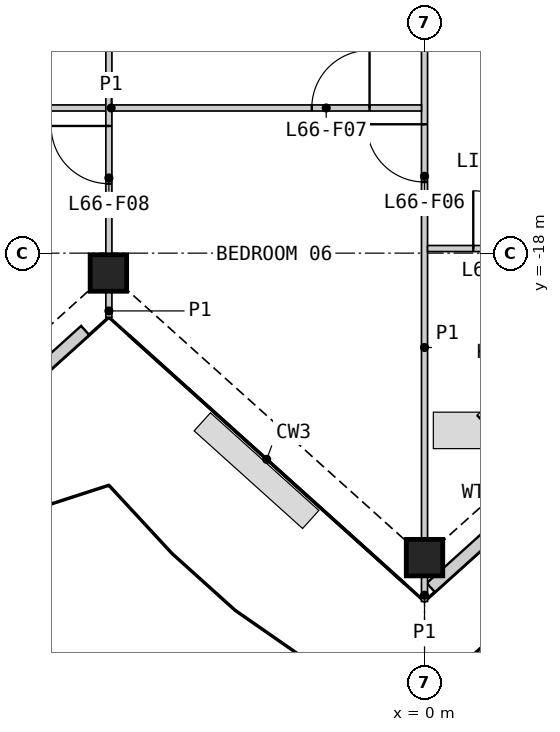
"""IFC4 building model, lengths in metres.
Left out: names, types, materials, properties, quantities, classifications, styles, units other than length and angle.
Written with IfcOpenShell. Run it as: python <this file> out.ifc"""

import sys

from ifc_helpers import new_model, si_unit, direction, frame, frame_2d, origin, origin_2d, place, context, subcontext, project, spatial, rectangle, hollow_rectangle, extrude, element, fill, save


model = new_model("IFC4")
c1 = context("Model", 3, precision=1e-05, world=origin(), true_north=direction((0.0, 1.0)))
c2 = subcontext(c1, "Body", "Model", "MODEL_VIEW")
j1 = project(units=[si_unit("LENGTHUNIT", "METRE"), si_unit("PLANEANGLEUNIT", "RADIAN")], contexts=[c1])
p1 = place(None, origin())
s1 = spatial("IfcSite", under=j1, at=p1, CompositionType="ELEMENT")
p2 = place(p1, origin())
s2 = spatial("IfcBuilding", under=s1, at=p2, CompositionType="ELEMENT")
p3 = place(p2, frame((0.0, 0.0, 305.2)))
s3 = spatial("IfcBuildingStorey", under=s2, at=p3, CompositionType="ELEMENT", Elevation=305.2)
for number, where, z_axis, x_axis in (
    (1, (-5.199, -18.327, 0.0), (0.0, 0.0, 1.0), (1.0, 0.0, 0.0)),
    (2, (0.0, -23.008, 0.0), (0.0, 0.0, 1.0), (1.0, 0.0, 0.0)),
):
    element("IfcColumn", number, at=place(p3, frame(where, z_axis=z_axis, x_axis=x_axis)), inside=s3, PredefinedType="COLUMN", context=c2, shape_type="SweptSolid", body=[
        extrude(hollow_rectangle(XDim=0.6, YDim=0.6, WallThickness=0.04, at=origin_2d()), origin(), (0.0, 0.0, 1.0), 3.4),
    ])
p4 = place(p3, frame((-10.203, -23.434, 0.0), z_axis=(0.0, 0.0, 1.0), x_axis=(0.74314582041, 0.669129501373, 0.0)))
e3 = element("IfcWall", 3, at=p4, inside=s3, PredefinedType="SOLIDWALL", context=c2, shape_type="SweptSolid", body=[
    extrude(rectangle(XDim=6.221, YDim=0.2, at=frame_2d((3.11, 0.0))), origin(), (0.0, 0.0, 1.0), 2.488),
])
p5 = place(p4, frame((2.362, 0.0, 0.0)))
e4 = element("IfcOpeningElement", 4, at=p5, cuts=e3, PredefinedType="OPENING", context=c2, shape_type="SweptSolid", body=[
    extrude(rectangle(XDim=1.6, YDim=2.25, at=frame_2d((0.8, 1.125))), frame((0.0, 0.11, 0.0), z_axis=(0.0, -1.0, 0.0), x_axis=(1.0, 0.0, 0.0)), (0.0, 0.0, 1.0), 0.22),
])
p6 = place(p3, frame((0.104, -23.501, 0.0), z_axis=(0.0, 0.0, 1.0), x_axis=(0.743137782456, 0.669138428344, 0.0)))
e5 = element("IfcWall", 5, at=p6, inside=s3, PredefinedType="SOLIDWALL", context=c2, shape_type="SweptSolid", body=[
    extrude(rectangle(XDim=6.678, YDim=0.2, at=frame_2d((3.339, 0.0))), origin(), (0.0, 0.0, 1.0), 2.488),
])
p7 = place(p6, frame((2.463, 0.0, 0.0)))
e6 = element("IfcOpeningElement", 6, at=p7, cuts=e5, PredefinedType="OPENING", context=c2, shape_type="SweptSolid", body=[
    extrude(rectangle(XDim=1.6, YDim=2.25, at=frame_2d((0.8, 1.125))), frame((0.0, 0.11, 0.0), z_axis=(0.0, -1.0, 0.0), x_axis=(1.0, 0.0, 0.0)), (0.0, 0.0, 1.0), 0.22),
])
p8 = place(p3, frame((0.0, -22.698, 0.0), z_axis=(0.0, 0.0, 1.0), x_axis=(0.0, 1.0, 0.0)))
e7 = element("IfcWall", 7, at=p8, inside=s3, PredefinedType="PARTITIONING", context=c2, shape_type="SweptSolid", body=[
    extrude(rectangle(XDim=12.585, YDim=0.1, at=frame_2d((6.292, 0.0))), origin(), (0.0, 0.0, 1.0), 2.33),
])
p9 = place(p8, frame((5.868, 0.0, 0.0)))
e8 = element("IfcOpeningElement", 8, at=p9, cuts=e7, PredefinedType="OPENING", context=c2, shape_type="SweptSolid", body=[
    extrude(rectangle(XDim=0.95, YDim=2.1, at=frame_2d((0.475, 1.05))), frame((0.0, 0.06, 0.0), z_axis=(0.0, -1.0, 0.0), x_axis=(1.0, 0.0, 0.0)), (0.0, 0.0, 1.0), 0.12),
])
p10 = place(p3, frame((0.05, -17.924, 0.0), z_axis=(0.0, 0.0, 1.0), x_axis=(1.0, 0.0, 0.0)))
e9 = element("IfcWall", 9, at=p10, inside=s3, PredefinedType="PARTITIONING", context=c2, shape_type="SweptSolid", body=[
    extrude(rectangle(XDim=10.282, YDim=0.1, at=frame_2d((5.141, 0.0))), origin(), (0.0, 0.0, 1.0), 2.33),
])
p11 = place(p10, frame((0.752, 0.0, 0.0)))
e10 = element("IfcOpeningElement", 10, at=p11, cuts=e9, PredefinedType="OPENING", context=c2, shape_type="SweptSolid", body=[
    extrude(rectangle(XDim=0.95, YDim=2.1, at=frame_2d((0.475, 1.05))), frame((0.0, 0.06, 0.0), z_axis=(0.0, -1.0, 0.0), x_axis=(1.0, 0.0, 0.0)), (0.0, 0.0, 1.0), 0.12),
])
p12 = place(p10, frame((8.58, 0.0, 0.0)))
e11 = element("IfcOpeningElement", 11, at=p12, cuts=e9, PredefinedType="OPENING", context=c2, shape_type="SweptSolid", body=[
    extrude(rectangle(XDim=0.95, YDim=2.1, at=frame_2d((0.475, 1.05))), frame((0.0, 0.06, 0.0), z_axis=(0.0, -1.0, 0.0), x_axis=(1.0, 0.0, 0.0)), (0.0, 0.0, 1.0), 0.12),
])
p13 = place(p3, frame((-10.257, -15.613, 0.0), z_axis=(0.0, 0.0, 1.0), x_axis=(1.0, 0.0, 0.0)))
e12 = element("IfcWall", 12, at=p13, inside=s3, PredefinedType="PARTITIONING", context=c2, shape_type="SweptSolid", body=[
    extrude(rectangle(XDim=10.207, YDim=0.1, at=frame_2d((5.104, 0.0))), origin(), (0.0, 0.0, 1.0), 2.33),
])
p14 = place(p13, frame((8.403, 0.0, 0.0)))
e13 = element("IfcOpeningElement", 13, at=p14, cuts=e12, PredefinedType="OPENING", context=c2, shape_type="SweptSolid", body=[
    extrude(rectangle(XDim=0.95, YDim=2.1, at=frame_2d((0.475, 1.05))), frame((0.0, 0.06, 0.0), z_axis=(0.0, -1.0, 0.0), x_axis=(1.0, 0.0, 0.0)), (0.0, 0.0, 1.0), 0.12),
])
p15 = place(p13, frame((0.653, 0.0, 0.0)))
e14 = element("IfcOpeningElement", 14, at=p15, cuts=e12, PredefinedType="OPENING", context=c2, shape_type="SweptSolid", body=[
    extrude(rectangle(XDim=0.95, YDim=2.1, at=frame_2d((0.475, 1.05))), frame((0.0, 0.06, 0.0), z_axis=(0.0, -1.0, 0.0), x_axis=(1.0, 0.0, 0.0)), (0.0, 0.0, 1.0), 0.12),
])
p16 = place(p3, frame((-5.191, -18.017, 0.0), z_axis=(0.0, 0.0, 1.0), x_axis=(0.0, 1.0, 0.0)))
e15 = element("IfcWall", 15, at=p16, inside=s3, PredefinedType="PARTITIONING", context=c2, shape_type="SweptSolid", body=[
    extrude(rectangle(XDim=8.011, YDim=0.1, at=frame_2d((4.006, 0.0))), origin(), (0.0, 0.0, 1.0), 2.33),
])
p17 = place(p16, frame((1.158, 0.0, 0.0)))
e16 = element("IfcOpeningElement", 16, at=p17, cuts=e15, PredefinedType="OPENING", context=c2, shape_type="SweptSolid", body=[
    extrude(rectangle(XDim=0.95, YDim=2.1, at=frame_2d((0.475, 1.05))), frame((0.0, 0.06, 0.0), z_axis=(0.0, -1.0, 0.0), x_axis=(1.0, 0.0, 0.0)), (0.0, 0.0, 1.0), 0.12),
])
p18 = place(p3, frame((-5.191, -19.055, 0.0), z_axis=(0.0, 0.0, 1.0), x_axis=(0.0, 1.0, 0.0)))
e17 = element("IfcWall", 17, at=p18, inside=s3, PredefinedType="PARTITIONING", context=c2, shape_type="SweptSolid", body=[
    extrude(rectangle(XDim=0.418, YDim=0.1, at=frame_2d((0.209, 0.0))), origin(), (0.0, 0.0, 1.0), 2.33),
])
p19 = place(p3, frame((0.0, -23.729, 0.0), z_axis=(0.0, 0.0, 1.0), x_axis=(0.0, 1.0, 0.0)))
e18 = element("IfcWall", 18, at=p19, inside=s3, PredefinedType="PARTITIONING", context=c2, shape_type="SweptSolid", body=[
    extrude(rectangle(XDim=0.411, YDim=0.1, at=frame_2d((0.206, 0.0))), origin(), (0.0, 0.0, 1.0), 2.33),
])
p20 = place(p11, origin())
e19 = element("IfcDoor", 19, at=p20, inside=s3, OperationType="SINGLE_SWING_LEFT", PredefinedType="DOOR", context=c2, shape_type="SweptSolid", body=[
    extrude(rectangle(XDim=0.95, YDim=2.1, at=frame_2d((0.475, 1.05))), frame((0.0, 0.025, 0.0), z_axis=(0.0, -1.0, 0.0), x_axis=(1.0, 0.0, 0.0)), (0.0, 0.0, 1.0), 0.05),
])
fill(e10, e19)
p21 = place(p9, origin())
e20 = element("IfcDoor", 20, at=p21, inside=s3, OperationType="SINGLE_SWING_RIGHT", PredefinedType="DOOR", context=c2, shape_type="SweptSolid", body=[
    extrude(rectangle(XDim=0.95, YDim=2.1, at=frame_2d((0.475, 1.05))), frame((0.0, 0.025, 0.0), z_axis=(0.0, -1.0, 0.0), x_axis=(1.0, 0.0, 0.0)), (0.0, 0.0, 1.0), 0.05),
])
fill(e8, e20)
p22 = place(p14, origin())
e21 = element("IfcDoor", 21, at=p22, inside=s3, OperationType="SINGLE_SWING_RIGHT", PredefinedType="DOOR", context=c2, shape_type="SweptSolid", body=[
    extrude(rectangle(XDim=0.95, YDim=2.1, at=frame_2d((0.475, 1.05))), frame((0.0, 0.025, 0.0), z_axis=(0.0, -1.0, 0.0), x_axis=(1.0, 0.0, 0.0)), (0.0, 0.0, 1.0), 0.05),
])
fill(e13, e21)
p23 = place(p17, origin())
e22 = element("IfcDoor", 22, at=p23, inside=s3, OperationType="SINGLE_SWING_RIGHT", PredefinedType="DOOR", context=c2, shape_type="SweptSolid", body=[
    extrude(rectangle(XDim=0.95, YDim=2.1, at=frame_2d((0.475, 1.05))), frame((0.0, 0.025, 0.0), z_axis=(0.0, -1.0, 0.0), x_axis=(1.0, 0.0, 0.0)), (0.0, 0.0, 1.0), 0.05),
])
fill(e16, e22)
save(model, sys.argv[1])
